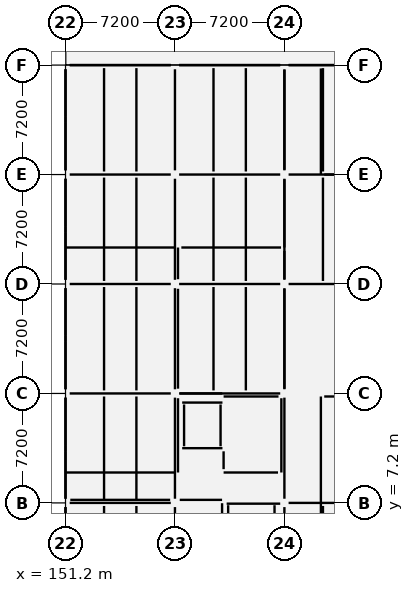
"""IFC4 building model, lengths in metres.
Left out: names, types, materials, properties, quantities, classifications, styles, units other than length and angle.
Written with IfcOpenShell. Run it as: python <this file> out.ifc"""

import sys

from ifc_helpers import new_model, si_unit, direction, frame, frame_2d, origin, origin_2d, place, context, subcontext, project, spatial, rectangle, extrude, element, fill, save


model = new_model("IFC4")
c1 = context("Model", 3, precision=1e-05, world=origin(), true_north=direction((0.0, 1.0)))
c2 = subcontext(c1, "Body", "Model", "MODEL_VIEW")
j1 = project(units=[si_unit("LENGTHUNIT", "METRE"), si_unit("PLANEANGLEUNIT", "RADIAN")], contexts=[c1])
p1 = place(None, origin())
s1 = spatial("IfcSite", under=j1, at=p1, CompositionType="ELEMENT")
p2 = place(p1, origin())
s2 = spatial("IfcBuilding", under=s1, at=p2, CompositionType="ELEMENT")
p3 = place(p2, frame((0.0, 0.0, 17.4)))
s3 = spatial("IfcBuildingStorey", under=s2, at=p3, CompositionType="ELEMENT", Elevation=17.4)
for number, where, z_axis, x_axis in (
    (1, (151.2, 7.2, 0.0), (0.0, 0.0, 1.0), (1.0, 0.0, 0.0)),
    (2, (151.2, 14.4, 0.0), (0.0, 0.0, 1.0), (1.0, 0.0, 0.0)),
    (3, (151.2, 21.6, 0.0), (0.0, 0.0, 1.0), (1.0, 0.0, 0.0)),
    (4, (151.2, 28.8, 0.0), (0.0, 0.0, 1.0), (1.0, 0.0, 0.0)),
    (5, (151.2, 36.0, 0.0), (0.0, 0.0, 1.0), (1.0, 0.0, 0.0)),
    (6, (158.4, 7.2, 0.0), (0.0, 0.0, 1.0), (1.0, 0.0, 0.0)),
    (7, (158.4, 14.4, 0.0), (0.0, 0.0, 1.0), (1.0, 0.0, 0.0)),
    (8, (158.4, 21.6, 0.0), (0.0, 0.0, 1.0), (1.0, 0.0, 0.0)),
    (9, (158.4, 28.8, 0.0), (0.0, 0.0, 1.0), (1.0, 0.0, 0.0)),
    (10, (158.4, 36.0, 0.0), (0.0, 0.0, 1.0), (1.0, 0.0, 0.0)),
    (11, (165.6, 7.2, 0.0), (0.0, 0.0, 1.0), (1.0, 0.0, 0.0)),
    (12, (165.6, 14.4, 0.0), (0.0, 0.0, 1.0), (1.0, 0.0, 0.0)),
    (13, (165.6, 21.6, 0.0), (0.0, 0.0, 1.0), (1.0, 0.0, 0.0)),
    (14, (165.6, 28.8, 0.0), (0.0, 0.0, 1.0), (1.0, 0.0, 0.0)),
    (15, (165.6, 36.0, 0.0), (0.0, 0.0, 1.0), (1.0, 0.0, 0.0)),
):
    element("IfcColumn", number, at=place(p3, frame(where, z_axis=z_axis, x_axis=x_axis)), inside=s3, PredefinedType="COLUMN", context=c2, shape_type="SweptSolid", body=[
        extrude(rectangle(XDim=0.55, YDim=0.55, at=origin_2d()), origin(), (0.0, 0.0, 1.0), 3.9),
    ])
for number, where, z_axis, x_axis in (
    (16, (158.875, 10.8, 0.0), (0.0, 0.0, 1.0), (1.0, 0.0, 0.0)),
    (17, (158.875, 13.8, 0.0), (0.0, 0.0, 1.0), (1.0, 0.0, 0.0)),
):
    element("IfcWall", number, at=place(p3, frame(where, z_axis=z_axis, x_axis=x_axis)), inside=s3, PredefinedType="SHEAR", context=c2, shape_type="SweptSolid", body=[
        extrude(rectangle(XDim=2.65, YDim=0.25, at=frame_2d((1.325, 0.0))), origin(), (0.0, 0.0, 1.0), 3.62),
    ])
p4 = place(p3, frame((159.0, 10.925, 0.0), z_axis=(0.0, 0.0, 1.0), x_axis=(0.0, 1.0, 0.0)))
e18 = element("IfcWall", 18, at=p4, inside=s3, PredefinedType="SHEAR", context=c2, shape_type="SweptSolid", body=[
    extrude(rectangle(XDim=2.75, YDim=0.25, at=frame_2d((1.375, 0.0))), origin(), (0.0, 0.0, 1.0), 3.62),
])
p5 = place(p3, frame((161.4, 10.925, 0.0), z_axis=(0.0, 0.0, 1.0), x_axis=(0.0, 1.0, 0.0)))
e19 = element("IfcWall", 19, at=p5, inside=s3, PredefinedType="SHEAR", context=c2, shape_type="SweptSolid", body=[
    extrude(rectangle(XDim=2.75, YDim=0.25, at=frame_2d((1.375, 0.0))), origin(), (0.0, 0.0, 1.0), 3.62),
])
p6 = place(p5, frame((0.825, 0.0, 0.0)))
e20 = element("IfcOpeningElement", 20, at=p6, cuts=e19, PredefinedType="OPENING", context=c2, shape_type="SweptSolid", body=[
    extrude(rectangle(XDim=1.1, YDim=2.15, at=frame_2d((0.55, 1.075))), frame((0.0, 0.137, 0.0), z_axis=(0.0, -1.0, 0.0), x_axis=(1.0, 0.0, 0.0)), (0.0, 0.0, 1.0), 0.274),
])
p7 = place(p3, frame((161.8, 7.15, 0.0), z_axis=(0.0, 0.0, 1.0), x_axis=(1.0, 0.0, 0.0)))
e21 = element("IfcWall", 21, at=p7, inside=s3, PredefinedType="SHEAR", context=c2, shape_type="SweptSolid", body=[
    extrude(rectangle(XDim=3.525, YDim=0.2, at=frame_2d((1.762, 0.0))), origin(), (0.0, 0.0, 1.0), 3.62),
])
p8 = place(p7, frame((1.212, 0.0, 0.0)))
e22 = element("IfcOpeningElement", 22, at=p8, cuts=e21, PredefinedType="OPENING", context=c2, shape_type="SweptSolid", body=[
    extrude(rectangle(XDim=1.1, YDim=2.15, at=frame_2d((0.55, 1.075))), frame((0.0, 0.112, 0.0), z_axis=(0.0, -1.0, 0.0), x_axis=(1.0, 0.0, 0.0)), (0.0, 0.0, 1.0), 0.224),
])
for number, where, z_axis, x_axis in (
    (23, (161.9, 0.43, 0.0), (0.0, 0.0, 1.0), (0.0, 1.0, 0.0)),
    (24, (164.95, 0.43, 0.0), (0.0, 0.0, 1.0), (0.0, 1.0, 0.0)),
):
    element("IfcWall", number, at=place(p3, frame(where, z_axis=z_axis, x_axis=x_axis)), inside=s3, PredefinedType="SHEAR", context=c2, shape_type="SweptSolid", body=[
        extrude(rectangle(XDim=6.62, YDim=0.2, at=frame_2d((3.31, 0.0))), origin(), (0.0, 0.0, 1.0), 3.62),
    ])
p9 = place(p3, frame((172.525, 36.0, 0.0), z_axis=(0.0, 0.0, 1.0), x_axis=(-1.0, 0.0, 0.0)))
e25 = element("IfcWall", 25, at=p9, inside=s3, PredefinedType="ELEMENTEDWALL", context=c2, shape_type="SweptSolid", body=[
    extrude(rectangle(XDim=6.65, YDim=0.28, at=frame_2d((3.325, 0.0))), origin(), (0.0, 0.0, 1.0), 2.9),
])
p10 = place(p9, frame((4.903, 0.0, 0.0)))
e26 = element("IfcOpeningElement", 26, at=p10, cuts=e25, PredefinedType="OPENING", context=c2, shape_type="SweptSolid", body=[
    extrude(rectangle(XDim=1.1, YDim=2.15, at=frame_2d((0.55, 1.075))), frame((0.0, 0.152, 0.0), z_axis=(0.0, -1.0, 0.0), x_axis=(1.0, 0.0, 0.0)), (0.0, 0.0, 1.0), 0.304),
])
p11 = place(p3, frame((165.325, 36.0, 0.0), z_axis=(0.0, 0.0, 1.0), x_axis=(-1.0, 0.0, 0.0)))
e27 = element("IfcWall", 27, at=p11, inside=s3, PredefinedType="ELEMENTEDWALL", context=c2, shape_type="SweptSolid", body=[
    extrude(rectangle(XDim=6.65, YDim=0.28, at=frame_2d((3.325, 0.0))), origin(), (0.0, 0.0, 1.0), 2.95),
])
p12 = place(p3, frame((158.125, 36.0, 0.0), z_axis=(0.0, 0.0, 1.0), x_axis=(-1.0, 0.0, 0.0)))
e28 = element("IfcWall", 28, at=p12, inside=s3, PredefinedType="ELEMENTEDWALL", context=c2, shape_type="SweptSolid", body=[
    extrude(rectangle(XDim=6.65, YDim=0.28, at=frame_2d((3.325, 0.0))), origin(), (0.0, 0.0, 1.0), 2.9),
])
p13 = place(p3, frame((151.2, 32.6, 0.0), z_axis=(0.0, 0.0, 1.0), x_axis=(0.0, -1.0, 0.0)))
e29 = element("IfcWall", 29, at=p13, inside=s3, PredefinedType="SOLIDWALL", context=c2, shape_type="SweptSolid", body=[
    extrude(rectangle(XDim=0.4, YDim=0.36, at=frame_2d((0.2, 0.0))), origin(), (0.0, 0.0, 1.0), 3.05),
])
p14 = place(p3, frame((151.2, 25.4, 0.0), z_axis=(0.0, 0.0, 1.0), x_axis=(0.0, -1.0, 0.0)))
e30 = element("IfcWall", 30, at=p14, inside=s3, PredefinedType="SOLIDWALL", context=c2, shape_type="SweptSolid", body=[
    extrude(rectangle(XDim=0.4, YDim=0.36, at=frame_2d((0.2, 0.0))), origin(), (0.0, 0.0, 1.0), 2.96),
])
p15 = place(p3, frame((151.2, 18.2, 0.0), z_axis=(0.0, 0.0, 1.0), x_axis=(0.0, -1.0, 0.0)))
e31 = element("IfcWall", 31, at=p15, inside=s3, PredefinedType="SOLIDWALL", context=c2, shape_type="SweptSolid", body=[
    extrude(rectangle(XDim=0.4, YDim=0.36, at=frame_2d((0.2, 0.0))), origin(), (0.0, 0.0, 1.0), 3.01),
])
p16 = place(p3, frame((151.2, 11.0, 0.0), z_axis=(0.0, 0.0, 1.0), x_axis=(0.0, -1.0, 0.0)))
e32 = element("IfcWall", 32, at=p16, inside=s3, PredefinedType="SOLIDWALL", context=c2, shape_type="SweptSolid", body=[
    extrude(rectangle(XDim=0.4, YDim=0.36, at=frame_2d((0.2, 0.0))), origin(), (0.0, 0.0, 1.0), 2.96),
])
p17 = place(p3, frame((165.4, 9.2, 0.0), z_axis=(0.0, 0.0, 1.0), x_axis=(0.0, 1.0, 0.0)))
e33 = element("IfcWall", 33, at=p17, inside=s3, PredefinedType="STANDARD", context=c2, shape_type="SweptSolid", body=[
    extrude(rectangle(XDim=4.885, YDim=0.22, at=frame_2d((2.442, 0.0))), origin(), (0.0, 0.0, 1.0), 2.958),
])
p18 = place(p17, frame((1.843, 0.0, 0.0)))
e34 = element("IfcOpeningElement", 34, at=p18, cuts=e33, PredefinedType="OPENING", context=c2, shape_type="SweptSolid", body=[
    extrude(rectangle(XDim=1.2, YDim=2.2, at=frame_2d((0.6, 1.1))), frame((0.0, 0.122, 0.0), z_axis=(0.0, -1.0, 0.0), x_axis=(1.0, 0.0, 0.0)), (0.0, 0.0, 1.0), 0.244),
])
p19 = place(p3, frame((161.6, 9.2, 0.0), z_axis=(0.0, 0.0, 1.0), x_axis=(1.0, 0.0, 0.0)))
e35 = element("IfcWall", 35, at=p19, inside=s3, PredefinedType="STANDARD", context=c2, shape_type="SweptSolid", body=[
    extrude(rectangle(XDim=3.58, YDim=0.22, at=frame_2d((1.79, 0.0))), origin(), (0.0, 0.0, 1.0), 3.612),
])
p20 = place(p3, frame((161.6, 14.2, 0.0), z_axis=(0.0, 0.0, 1.0), x_axis=(1.0, 0.0, 0.0)))
e36 = element("IfcWall", 36, at=p20, inside=s3, PredefinedType="STANDARD", context=c2, shape_type="SweptSolid", body=[
    extrude(rectangle(XDim=3.613, YDim=0.22, at=frame_2d((1.806, 0.0))), origin(), (0.0, 0.0, 1.0), 2.908),
])
p21 = place(p3, frame((161.6, 9.42, 0.0), z_axis=(0.0, 0.0, 1.0), x_axis=(0.0, 1.0, 0.0)))
e37 = element("IfcWall", 37, at=p21, inside=s3, PredefinedType="STANDARD", context=c2, shape_type="SweptSolid", body=[
    extrude(rectangle(XDim=1.174, YDim=0.22, at=frame_2d((0.587, 0.0))), origin(), (0.0, 0.0, 1.0), 3.612),
])
p22 = place(p3, frame((151.515, 7.4, 0.0), z_axis=(0.0, 0.0, 1.0), x_axis=(1.0, 0.0, 0.0)))
e38 = element("IfcWall", 38, at=p22, inside=s3, PredefinedType="STANDARD", context=c2, shape_type="SweptSolid", body=[
    extrude(rectangle(XDim=6.57, YDim=0.22, at=frame_2d((3.285, 0.0))), origin(), (0.0, 0.0, 1.0), 2.858),
])
p23 = place(p22, frame((2.785, 0.0, 0.0)))
e39 = element("IfcOpeningElement", 39, at=p23, cuts=e38, PredefinedType="OPENING", context=c2, shape_type="SweptSolid", body=[
    extrude(rectangle(XDim=1.0, YDim=2.15, at=frame_2d((0.5, 1.075))), frame((0.0, 0.122, 0.0), z_axis=(0.0, -1.0, 0.0), x_axis=(1.0, 0.0, 0.0)), (0.0, 0.0, 1.0), 0.244),
])
p24 = place(p3, frame((158.715, 7.4, 0.0), z_axis=(0.0, 0.0, 1.0), x_axis=(1.0, 0.0, 0.0)))
e40 = element("IfcWall", 40, at=p24, inside=s3, PredefinedType="STANDARD", context=c2, shape_type="SweptSolid", body=[
    extrude(rectangle(XDim=2.785, YDim=0.22, at=frame_2d((1.393, 0.0))), origin(), (0.0, 0.0, 1.0), 3.612),
])
p25 = place(p3, frame((161.5, 0.0, 0.0), z_axis=(0.0, 0.0, 1.0), x_axis=(0.0, 1.0, 0.0)))
e41 = element("IfcWall", 41, at=p25, inside=s3, PredefinedType="STANDARD", context=c2, shape_type="SweptSolid", body=[
    extrude(rectangle(XDim=7.18, YDim=0.22, at=frame_2d((3.59, 0.0))), origin(), (0.0, 0.0, 1.0), 2.958),
])
p26 = place(p3, frame((158.6, 9.2, 0.0), z_axis=(0.0, 0.0, 1.0), x_axis=(0.0, 1.0, 0.0)))
e42 = element("IfcWall", 42, at=p26, inside=s3, PredefinedType="PARTITIONING", context=c2, shape_type="SweptSolid", body=[
    extrude(rectangle(XDim=4.885, YDim=0.1, at=frame_2d((2.442, 0.0))), origin(), (0.0, 0.0, 1.0), 3.008),
])
p27 = place(p3, frame((158.6, 14.715, 0.0), z_axis=(0.0, 0.0, 1.0), x_axis=(0.0, 1.0, 0.0)))
e43 = element("IfcWall", 43, at=p27, inside=s3, PredefinedType="PARTITIONING", context=c2, shape_type="SweptSolid", body=[
    extrude(rectangle(XDim=6.57, YDim=0.1, at=frame_2d((3.285, 0.0))), origin(), (0.0, 0.0, 1.0), 2.958),
])
p28 = place(p3, frame((158.6, 21.915, 0.0), z_axis=(0.0, 0.0, 1.0), x_axis=(0.0, 1.0, 0.0)))
e44 = element("IfcWall", 44, at=p28, inside=s3, PredefinedType="PARTITIONING", context=c2, shape_type="SweptSolid", body=[
    extrude(rectangle(XDim=2.085, YDim=0.1, at=frame_2d((1.042, 0.0))), origin(), (0.0, 0.0, 1.0), 3.008),
])
p29 = place(p3, frame((151.2, 9.2, 0.0), z_axis=(0.0, 0.0, 1.0), x_axis=(1.0, 0.0, 0.0)))
e45 = element("IfcWall", 45, at=p29, inside=s3, PredefinedType="PARTITIONING", context=c2, shape_type="SweptSolid", body=[
    extrude(rectangle(XDim=7.18, YDim=0.1, at=frame_2d((3.59, 0.0))), origin(), (0.0, 0.0, 1.0), 2.958),
])
p30 = place(p29, frame((3.09, 0.0, 0.0)))
e46 = element("IfcOpeningElement", 46, at=p30, cuts=e45, PredefinedType="OPENING", context=c2, shape_type="SweptSolid", body=[
    extrude(rectangle(XDim=1.0, YDim=2.15, at=frame_2d((0.5, 1.075))), frame((0.0, 0.062, 0.0), z_axis=(0.0, -1.0, 0.0), x_axis=(1.0, 0.0, 0.0)), (0.0, 0.0, 1.0), 0.124),
])
p31 = place(p3, frame((151.2, 24.0, 0.0), z_axis=(0.0, 0.0, 1.0), x_axis=(1.0, 0.0, 0.0)))
e47 = element("IfcWall", 47, at=p31, inside=s3, PredefinedType="PARTITIONING", context=c2, shape_type="SweptSolid", body=[
    extrude(rectangle(XDim=7.18, YDim=0.1, at=frame_2d((3.59, 0.0))), origin(), (0.0, 0.0, 1.0), 2.958),
])
p32 = place(p3, frame((165.6, 24.0, 0.0), z_axis=(0.0, 0.0, 1.0), x_axis=(0.0, 1.0, 0.0)))
e48 = element("IfcWall", 48, at=p32, inside=s3, PredefinedType="PARTITIONING", context=c2, shape_type="SweptSolid", body=[
    extrude(rectangle(XDim=4.485, YDim=0.12, at=frame_2d((2.243, 0.0))), origin(), (0.0, 0.0, 1.0), 2.958),
])
p33 = place(p32, frame((1.718, 0.0, 0.0)))
e49 = element("IfcOpeningElement", 49, at=p33, cuts=e48, PredefinedType="OPENING", context=c2, shape_type="SweptSolid", body=[
    extrude(rectangle(XDim=1.05, YDim=2.15, at=frame_2d((0.525, 1.075))), frame((0.0, 0.072, 0.0), z_axis=(0.0, -1.0, 0.0), x_axis=(1.0, 0.0, 0.0)), (0.0, 0.0, 1.0), 0.144),
])
p34 = place(p3, frame((165.6, 29.115, 0.0), z_axis=(0.0, 0.0, 1.0), x_axis=(0.0, 1.0, 0.0)))
e50 = element("IfcWall", 50, at=p34, inside=s3, PredefinedType="PARTITIONING", context=c2, shape_type="SweptSolid", body=[
    extrude(rectangle(XDim=6.57, YDim=0.12, at=frame_2d((3.285, 0.0))), origin(), (0.0, 0.0, 1.0), 3.048),
])
p35 = place(p3, frame((158.82, 24.0, 0.0), z_axis=(0.0, 0.0, 1.0), x_axis=(1.0, 0.0, 0.0)))
e51 = element("IfcWall", 51, at=p35, inside=s3, PredefinedType="PARTITIONING", context=c2, shape_type="SweptSolid", body=[
    extrude(rectangle(XDim=6.56, YDim=0.12, at=frame_2d((3.28, 0.0))), origin(), (0.0, 0.0, 1.0), 3.058),
])
p36 = place(p3, frame((165.6, 14.715, 0.0), z_axis=(0.0, 0.0, 1.0), x_axis=(0.0, 1.0, 0.0)))
e52 = element("IfcWall", 52, at=p36, inside=s3, PredefinedType="STANDARD", context=c2, shape_type="SweptSolid", body=[
    extrude(rectangle(XDim=6.57, YDim=0.22, at=frame_2d((3.285, 0.0))), origin(), (0.0, 0.0, 1.0), 3.008),
])
p37 = place(p36, frame((2.61, 0.0, 0.0)))
e53 = element("IfcOpeningElement", 53, at=p37, cuts=e52, PredefinedType="OPENING", context=c2, shape_type="SweptSolid", body=[
    extrude(rectangle(XDim=1.35, YDim=2.2, at=frame_2d((0.675, 1.1))), frame((0.0, 0.122, 0.0), z_axis=(0.0, -1.0, 0.0), x_axis=(1.0, 0.0, 0.0)), (0.0, 0.0, 1.0), 0.244),
])
p38 = place(p3, frame((165.6, 21.915, 0.0), z_axis=(0.0, 0.0, 1.0), x_axis=(0.0, 1.0, 0.0)))
e54 = element("IfcWall", 54, at=p38, inside=s3, PredefinedType="STANDARD", context=c2, shape_type="SweptSolid", body=[
    extrude(rectangle(XDim=1.865, YDim=0.22, at=frame_2d((0.933, 0.0))), origin(), (0.0, 0.0, 1.0), 2.958),
])
p39 = place(p3, frame((158.715, 14.4, 0.0), z_axis=(0.0, 0.0, 1.0), x_axis=(1.0, 0.0, 0.0)))
e55 = element("IfcWall", 55, at=p39, inside=s3, PredefinedType="STANDARD", context=c2, shape_type="SweptSolid", body=[
    extrude(rectangle(XDim=2.794, YDim=0.22, at=frame_2d((1.397, 0.0))), origin(), (0.0, 0.0, 1.0), 2.908),
])
p40 = place(p3, frame((168.0, 28.8, 0.0), z_axis=(0.0, 0.0, 1.0), x_axis=(0.0, 1.0, 0.0)))
e56 = element("IfcWall", 56, at=p40, inside=s3, PredefinedType="PLUMBINGWALL", context=c2, shape_type="SweptSolid", body=[
    extrude(rectangle(XDim=6.98, YDim=0.18, at=frame_2d((3.49, 0.0))), origin(), (0.0, 0.0, 1.0), 2.898),
])
p41 = place(p40, frame((3.04, 0.0, 0.0)))
e57 = element("IfcOpeningElement", 57, at=p41, cuts=e56, PredefinedType="OPENING", context=c2, shape_type="SweptSolid", body=[
    extrude(rectangle(XDim=0.9, YDim=2.1, at=frame_2d((0.45, 1.05))), frame((0.0, 0.102, 0.0), z_axis=(0.0, -1.0, 0.0), x_axis=(1.0, 0.0, 0.0)), (0.0, 0.0, 1.0), 0.204),
])
p42 = place(p3, frame((168.22, 28.8, 0.0), z_axis=(0.0, 0.0, 1.0), x_axis=(1.0, 0.0, 0.0)))
e58 = element("IfcWall", 58, at=p42, inside=s3, PredefinedType="PLUMBINGWALL", context=c2, shape_type="SweptSolid", body=[
    extrude(rectangle(XDim=4.265, YDim=0.18, at=frame_2d((2.133, 0.0))), origin(), (0.0, 0.0, 1.0), 2.908),
])
p43 = place(p3, frame((168.0, 0.0, 0.0), z_axis=(0.0, 0.0, 1.0), x_axis=(0.0, 1.0, 0.0)))
e59 = element("IfcWall", 59, at=p43, inside=s3, PredefinedType="STANDARD", context=c2, shape_type="SweptSolid", body=[
    extrude(rectangle(XDim=14.2, YDim=0.15, at=frame_2d((7.1, 0.0))), origin(), (0.0, 0.0, 1.0), 2.908),
])
p44 = place(p43, frame((6.575, 0.0, 0.0)))
e60 = element("IfcOpeningElement", 60, at=p44, cuts=e59, PredefinedType="OPENING", context=c2, shape_type="SweptSolid", body=[
    extrude(rectangle(XDim=1.05, YDim=2.15, at=frame_2d((0.525, 1.075))), frame((0.0, 0.087, 0.0), z_axis=(0.0, -1.0, 0.0), x_axis=(1.0, 0.0, 0.0)), (0.0, 0.0, 1.0), 0.174),
])
p45 = place(p3, frame((168.22, 14.2, 0.0), z_axis=(0.0, 0.0, 1.0), x_axis=(1.0, 0.0, 0.0)))
e61 = element("IfcWall", 61, at=p45, inside=s3, PredefinedType="STANDARD", context=c2, shape_type="SweptSolid", body=[
    extrude(rectangle(XDim=4.265, YDim=0.15, at=frame_2d((2.133, 0.0))), origin(), (0.0, 0.0, 1.0), 3.612),
])
p46 = place(p10, frame((1.1, 0.0, 0.0), z_axis=(0.0, 0.0, 1.0), x_axis=(-1.0, 0.0, 0.0)))
e62 = element("IfcDoor", 62, at=p46, inside=s3, OperationType="SINGLE_SWING_LEFT", PredefinedType="DOOR", context=c2, shape_type="SweptSolid", body=[
    extrude(rectangle(XDim=1.1, YDim=2.15, at=frame_2d((0.55, 1.075))), frame((0.0, 0.025, 0.0), z_axis=(0.0, -1.0, 0.0), x_axis=(1.0, 0.0, 0.0)), (0.0, 0.0, 1.0), 0.05),
])
fill(e26, e62)
p47 = place(p8, frame((1.1, 0.0, 0.0), z_axis=(0.0, 0.0, 1.0), x_axis=(-1.0, 0.0, 0.0)))
e63 = element("IfcDoor", 63, at=p47, inside=s3, OperationType="SINGLE_SWING_LEFT", PredefinedType="DOOR", context=c2, shape_type="SweptSolid", body=[
    extrude(rectangle(XDim=1.1, YDim=2.15, at=frame_2d((0.55, 1.075))), frame((0.0, 0.025, 0.0), z_axis=(0.0, -1.0, 0.0), x_axis=(1.0, 0.0, 0.0)), (0.0, 0.0, 1.0), 0.05),
])
fill(e22, e63)
p48 = place(p6, origin())
e64 = element("IfcDoor", 64, at=p48, inside=s3, OperationType="SLIDING_TO_LEFT", PredefinedType="DOOR", context=c2, shape_type="SweptSolid", body=[
    extrude(rectangle(XDim=1.1, YDim=2.15, at=frame_2d((0.55, 1.075))), frame((0.0, 0.025, 0.0), z_axis=(0.0, -1.0, 0.0), x_axis=(1.0, 0.0, 0.0)), (0.0, 0.0, 1.0), 0.05),
])
fill(e20, e64)
p49 = place(p18, origin())
e65 = element("IfcDoor", 65, at=p49, inside=s3, OperationType="SINGLE_SWING_RIGHT", PredefinedType="DOOR", context=c2, shape_type="SweptSolid", body=[
    extrude(rectangle(XDim=1.2, YDim=2.2, at=frame_2d((0.6, 1.1))), frame((0.0, 0.025, 0.0), z_axis=(0.0, -1.0, 0.0), x_axis=(1.0, 0.0, 0.0)), (0.0, 0.0, 1.0), 0.05),
])
fill(e34, e65)
p50 = place(p23, origin())
e66 = element("IfcDoor", 66, at=p50, inside=s3, OperationType="SINGLE_SWING_LEFT", PredefinedType="DOOR", context=c2, shape_type="SweptSolid", body=[
    extrude(rectangle(XDim=1.0, YDim=2.15, at=frame_2d((0.5, 1.075))), frame((0.0, 0.025, 0.0), z_axis=(0.0, -1.0, 0.0), x_axis=(1.0, 0.0, 0.0)), (0.0, 0.0, 1.0), 0.05),
])
fill(e39, e66)
p51 = place(p30, origin())
e67 = element("IfcDoor", 67, at=p51, inside=s3, OperationType="SINGLE_SWING_RIGHT", PredefinedType="DOOR", context=c2, shape_type="SweptSolid", body=[
    extrude(rectangle(XDim=1.0, YDim=2.15, at=frame_2d((0.5, 1.075))), frame((0.0, 0.025, 0.0), z_axis=(0.0, -1.0, 0.0), x_axis=(1.0, 0.0, 0.0)), (0.0, 0.0, 1.0), 0.05),
])
fill(e46, e67)
p52 = place(p33, origin())
e68 = element("IfcDoor", 68, at=p52, inside=s3, OperationType="SINGLE_SWING_LEFT", PredefinedType="DOOR", context=c2, shape_type="SweptSolid", body=[
    extrude(rectangle(XDim=1.05, YDim=2.15, at=frame_2d((0.525, 1.075))), frame((0.0, 0.025, 0.0), z_axis=(0.0, -1.0, 0.0), x_axis=(1.0, 0.0, 0.0)), (0.0, 0.0, 1.0), 0.05),
])
fill(e49, e68)
p53 = place(p37, origin())
e69 = element("IfcDoor", 69, at=p53, inside=s3, OperationType="SINGLE_SWING_RIGHT", PredefinedType="DOOR", context=c2, shape_type="SweptSolid", body=[
    extrude(rectangle(XDim=1.35, YDim=2.2, at=frame_2d((0.675, 1.1))), frame((0.0, 0.025, 0.0), z_axis=(0.0, -1.0, 0.0), x_axis=(1.0, 0.0, 0.0)), (0.0, 0.0, 1.0), 0.05),
])
fill(e53, e69)
p54 = place(p41, origin())
e70 = element("IfcDoor", 70, at=p54, inside=s3, OperationType="SINGLE_SWING_LEFT", PredefinedType="DOOR", context=c2, shape_type="SweptSolid", body=[
    extrude(rectangle(XDim=0.9, YDim=2.1, at=frame_2d((0.45, 1.05))), frame((0.0, 0.025, 0.0), z_axis=(0.0, -1.0, 0.0), x_axis=(1.0, 0.0, 0.0)), (0.0, 0.0, 1.0), 0.05),
])
fill(e57, e70)
p55 = place(p44, origin())
e71 = element("IfcDoor", 71, at=p55, inside=s3, OperationType="SINGLE_SWING_RIGHT", PredefinedType="DOOR", context=c2, shape_type="SweptSolid", body=[
    extrude(rectangle(XDim=1.05, YDim=2.15, at=frame_2d((0.525, 1.075))), frame((0.0, 0.025, 0.0), z_axis=(0.0, -1.0, 0.0), x_axis=(1.0, 0.0, 0.0)), (0.0, 0.0, 1.0), 0.05),
])
fill(e60, e71)
save(model, sys.argv[1])
